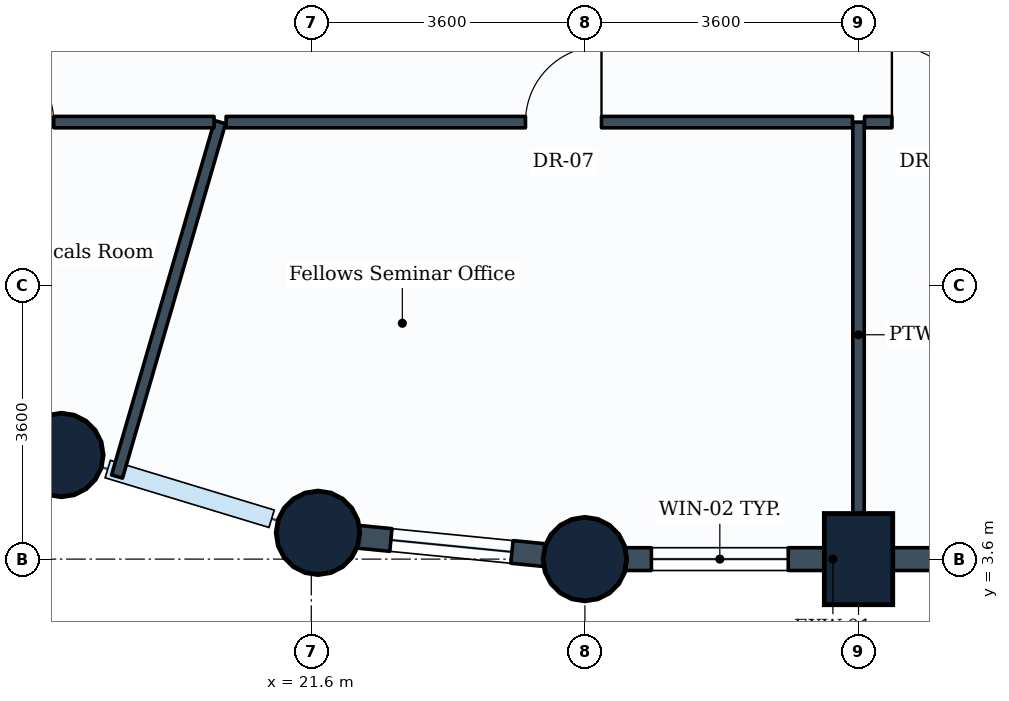
"""IFC4 building model, lengths in metres.
Left out: names, types, materials, properties, quantities, classifications, styles, units other than length and angle.
Written with IfcOpenShell. Run it as: python <this file> out.ifc"""

import sys

from ifc_helpers import new_model, si_unit, direction, frame, frame_2d, origin, origin_2d, place, context, subcontext, project, spatial, rectangle, circle, extrude, element, fill, save


model = new_model("IFC4")
c1 = context("Model", 3, precision=1e-05, world=origin(), true_north=direction((0.0, 1.0)))
c2 = subcontext(c1, "Body", "Model", "MODEL_VIEW")
j1 = project(units=[si_unit("LENGTHUNIT", "METRE"), si_unit("PLANEANGLEUNIT", "RADIAN")], contexts=[c1])
p1 = place(None, origin())
s1 = spatial("IfcSite", under=j1, at=p1, CompositionType="ELEMENT")
p2 = place(p1, origin())
s2 = spatial("IfcBuilding", under=s1, at=p2, CompositionType="ELEMENT")
p3 = place(p2, frame((0.0, 0.0, 39.6)))
s3 = spatial("IfcBuildingStorey", under=s2, at=p3, CompositionType="ELEMENT", Elevation=39.6)
for number, where, z_axis, x_axis in (
    (1, (18.312, 4.97, 0.0), (0.0, 0.0, 1.0), (1.0, 0.0, 0.0)),
    (2, (21.688, 3.946, 0.0), (0.0, 0.0, 1.0), (1.0, 0.0, 0.0)),
    (3, (25.2, 3.6, 0.0), (0.0, 0.0, 1.0), (1.0, 0.0, 0.0)),
):
    element("IfcColumn", number, at=place(p3, frame(where, z_axis=z_axis, x_axis=x_axis)), inside=s3, PredefinedType="COLUMN", context=c2, shape_type="SweptSolid", body=[
        extrude(circle(Radius=0.55, at=origin_2d()), origin(), (0.0, 0.0, 1.0), 3.9),
    ])
p4 = place(p3, frame((28.8, 3.6, 0.0), z_axis=(0.0, 0.0, 1.0), x_axis=(1.0, 0.0, 0.0)))
e4 = element("IfcColumn", 4, at=p4, inside=s3, PredefinedType="COLUMN", context=c2, shape_type="SweptSolid", body=[
    extrude(rectangle(XDim=0.9, YDim=1.2, at=origin_2d()), origin(), (0.0, 0.0, 1.0), 3.9),
])
p5 = place(p3, frame((28.8, 3.6, 0.0), z_axis=(0.0, 0.0, 1.0), x_axis=(-1.0, 0.0, 0.0)))
e5 = element("IfcWall", 5, at=p5, inside=s3, PredefinedType="STANDARD", context=c2, shape_type="SweptSolid", body=[
    extrude(rectangle(XDim=3.6, YDim=0.3, at=frame_2d((1.8, 0.0))), origin(), (0.0, 0.0, 1.0), 2.93),
])
p6 = place(p5, frame((0.925, 0.0, 0.85)))
e6 = element("IfcOpeningElement", 6, at=p6, cuts=e5, PredefinedType="OPENING", context=c2, shape_type="SweptSolid", body=[
    extrude(rectangle(XDim=1.8, YDim=1.35, at=frame_2d((0.9, 0.675))), frame((0.0, 0.16, 0.0), z_axis=(0.0, -1.0, 0.0), x_axis=(1.0, 0.0, 0.0)), (0.0, 0.0, 1.0), 0.32),
])
p7 = place(p3, frame((32.4, 3.6, 0.0), z_axis=(0.0, 0.0, 1.0), x_axis=(-1.0, 0.0, 0.0)))
e7 = element("IfcWall", 7, at=p7, inside=s3, PredefinedType="STANDARD", context=c2, shape_type="SweptSolid", body=[
    extrude(rectangle(XDim=3.6, YDim=0.3, at=frame_2d((1.8, 0.0))), origin(), (0.0, 0.0, 1.0), 2.93),
])
p8 = place(p3, frame((18.312, 4.97, 0.0), z_axis=(0.0, 0.0, 1.0), x_axis=(-0.881846862014, 0.471535907389, 0.0)))
e8 = element("IfcWall", 8, at=p8, inside=s3, PredefinedType="STANDARD", context=c2, shape_type="SweptSolid", body=[
    extrude(rectangle(XDim=3.529, YDim=0.3, at=frame_2d((1.765, 0.0))), origin(), (0.0, 0.0, 1.0), 2.93),
])
p9 = place(p8, frame((0.964, 0.0, 0.85)))
e9 = element("IfcOpeningElement", 9, at=p9, cuts=e8, PredefinedType="OPENING", context=c2, shape_type="SweptSolid", body=[
    extrude(rectangle(XDim=1.6, YDim=1.35, at=frame_2d((0.8, 0.675))), frame((0.0, 0.16, 0.0), z_axis=(0.0, -1.0, 0.0), x_axis=(1.0, 0.0, 0.0)), (0.0, 0.0, 1.0), 0.32),
])
p10 = place(p3, frame((25.2, 3.6, 0.0), z_axis=(0.0, 0.0, 1.0), x_axis=(-0.995183369056, 0.098030923459, 0.0)))
e10 = element("IfcWall", 10, at=p10, inside=s3, PredefinedType="STANDARD", context=c2, shape_type="SweptSolid", body=[
    extrude(rectangle(XDim=3.529, YDim=0.3, at=frame_2d((1.765, 0.0))), origin(), (0.0, 0.0, 1.0), 2.93),
])
p11 = place(p10, frame((0.965, 0.0, 0.85)))
e11 = element("IfcOpeningElement", 11, at=p11, cuts=e10, PredefinedType="OPENING", context=c2, shape_type="SweptSolid", body=[
    extrude(rectangle(XDim=1.6, YDim=1.35, at=frame_2d((0.8, 0.675))), frame((0.0, 0.16, 0.0), z_axis=(0.0, -1.0, 0.0), x_axis=(1.0, 0.0, 0.0)), (0.0, 0.0, 1.0), 0.32),
])
p12 = place(p3, frame((28.8, 9.35, 0.0), z_axis=(0.0, 0.0, 1.0), x_axis=(0.0, -1.0, 0.0)))
e12 = element("IfcWall", 12, at=p12, inside=s3, PredefinedType="PARTITIONING", context=c2, shape_type="SweptSolid", body=[
    extrude(rectangle(XDim=5.596, YDim=0.15, at=frame_2d((2.798, 0.0))), origin(), (0.0, 0.0, 1.0), 3.635),
])
p13 = place(p3, frame((20.4, 9.35, 0.0), z_axis=(0.0, 0.0, 1.0), x_axis=(-0.27916607548, -0.960242835069, 0.0)))
e13 = element("IfcWall", 13, at=p13, inside=s3, PredefinedType="PARTITIONING", context=c2, shape_type="SweptSolid", body=[
    extrude(rectangle(XDim=4.857, YDim=0.15, at=frame_2d((2.429, 0.0))), origin(), (0.0, 0.0, 1.0), 2.93),
])
p14 = place(p3, frame((12.234, 9.35, 0.0), z_axis=(0.0, 0.0, 1.0), x_axis=(1.0, 0.0, 0.0)))
e14 = element("IfcWall", 14, at=p14, inside=s3, PredefinedType="PARTITIONING", context=c2, shape_type="SweptSolid", body=[
    extrude(rectangle(XDim=8.087, YDim=0.15, at=frame_2d((4.043, 0.0))), origin(), (0.0, 0.0, 1.0), 2.93),
])
p15 = place(p14, frame((4.977, 0.0, 0.0)))
e15 = element("IfcOpeningElement", 15, at=p15, cuts=e14, PredefinedType="OPENING", context=c2, shape_type="SweptSolid", body=[
    extrude(rectangle(XDim=1.0, YDim=2.1, at=frame_2d((0.5, 1.05))), frame((0.0, 0.085, 0.0), z_axis=(0.0, -1.0, 0.0), x_axis=(1.0, 0.0, 0.0)), (0.0, 0.0, 1.0), 0.17),
])
p16 = place(p3, frame((20.479, 9.35, 0.0), z_axis=(0.0, 0.0, 1.0), x_axis=(1.0, 0.0, 0.0)))
e16 = element("IfcWall", 16, at=p16, inside=s3, PredefinedType="PARTITIONING", context=c2, shape_type="SweptSolid", body=[
    extrude(rectangle(XDim=8.242, YDim=0.15, at=frame_2d((4.121, 0.0))), origin(), (0.0, 0.0, 1.0), 3.08),
])
p17 = place(p16, frame((3.939, 0.0, 0.0)))
e17 = element("IfcOpeningElement", 17, at=p17, cuts=e16, PredefinedType="OPENING", context=c2, shape_type="SweptSolid", body=[
    extrude(rectangle(XDim=1.0, YDim=2.1, at=frame_2d((0.5, 1.05))), frame((0.0, 0.085, 0.0), z_axis=(0.0, -1.0, 0.0), x_axis=(1.0, 0.0, 0.0)), (0.0, 0.0, 1.0), 0.17),
])
p18 = place(p3, frame((28.879, 9.35, 0.0), z_axis=(0.0, 0.0, 1.0), x_axis=(1.0, 0.0, 0.0)))
e18 = element("IfcWall", 18, at=p18, inside=s3, PredefinedType="PARTITIONING", context=c2, shape_type="SweptSolid", body=[
    extrude(rectangle(XDim=5.521, YDim=0.15, at=frame_2d((2.76, 0.0))), origin(), (0.0, 0.0, 1.0), 3.635),
])
p19 = place(p18, frame((0.36, 0.0, 0.0)))
e19 = element("IfcOpeningElement", 19, at=p19, cuts=e18, PredefinedType="OPENING", context=c2, shape_type="SweptSolid", body=[
    extrude(rectangle(XDim=1.0, YDim=2.1, at=frame_2d((0.5, 1.05))), frame((0.0, 0.085, 0.0), z_axis=(0.0, -1.0, 0.0), x_axis=(1.0, 0.0, 0.0)), (0.0, 0.0, 1.0), 0.17),
])
p20 = place(p6, origin())
e20 = element("IfcWindow", 20, at=p20, inside=s3, PartitioningType="SINGLE_PANEL", PredefinedType="WINDOW", context=c2, shape_type="SweptSolid", body=[
    extrude(rectangle(XDim=1.8, YDim=1.35, at=frame_2d((0.9, 0.675))), frame((0.0, 0.03, 0.0), z_axis=(0.0, -1.0, 0.0), x_axis=(1.0, 0.0, 0.0)), (0.0, 0.0, 1.0), 0.06),
])
fill(e6, e20)
p21 = place(p11, origin())
e21 = element("IfcWindow", 21, at=p21, inside=s3, PartitioningType="SINGLE_PANEL", PredefinedType="WINDOW", context=c2, shape_type="SweptSolid", body=[
    extrude(rectangle(XDim=1.6, YDim=1.35, at=frame_2d((0.8, 0.675))), frame((0.0, 0.03, 0.0), z_axis=(0.0, -1.0, 0.0), x_axis=(1.0, 0.0, 0.0)), (0.0, 0.0, 1.0), 0.06),
])
fill(e11, e21)
p22 = place(p15, origin())
e22 = element("IfcDoor", 22, at=p22, inside=s3, OperationType="SINGLE_SWING_LEFT", PredefinedType="DOOR", context=c2, shape_type="SweptSolid", body=[
    extrude(rectangle(XDim=1.0, YDim=2.1, at=frame_2d((0.5, 1.05))), frame((0.0, 0.025, 0.0), z_axis=(0.0, -1.0, 0.0), x_axis=(1.0, 0.0, 0.0)), (0.0, 0.0, 1.0), 0.05),
])
fill(e15, e22)
p23 = place(p17, origin())
e23 = element("IfcDoor", 23, at=p23, inside=s3, OperationType="SINGLE_SWING_RIGHT", PredefinedType="DOOR", context=c2, shape_type="SweptSolid", body=[
    extrude(rectangle(XDim=1.0, YDim=2.1, at=frame_2d((0.5, 1.05))), frame((0.0, 0.025, 0.0), z_axis=(0.0, -1.0, 0.0), x_axis=(1.0, 0.0, 0.0)), (0.0, 0.0, 1.0), 0.05),
])
fill(e17, e23)
p24 = place(p19, origin())
e24 = element("IfcDoor", 24, at=p24, inside=s3, OperationType="SINGLE_SWING_LEFT", PredefinedType="DOOR", context=c2, shape_type="SweptSolid", body=[
    extrude(rectangle(XDim=1.0, YDim=2.1, at=frame_2d((0.5, 1.05))), frame((0.0, 0.025, 0.0), z_axis=(0.0, -1.0, 0.0), x_axis=(1.0, 0.0, 0.0)), (0.0, 0.0, 1.0), 0.05),
])
fill(e19, e24)
save(model, sys.argv[1])
